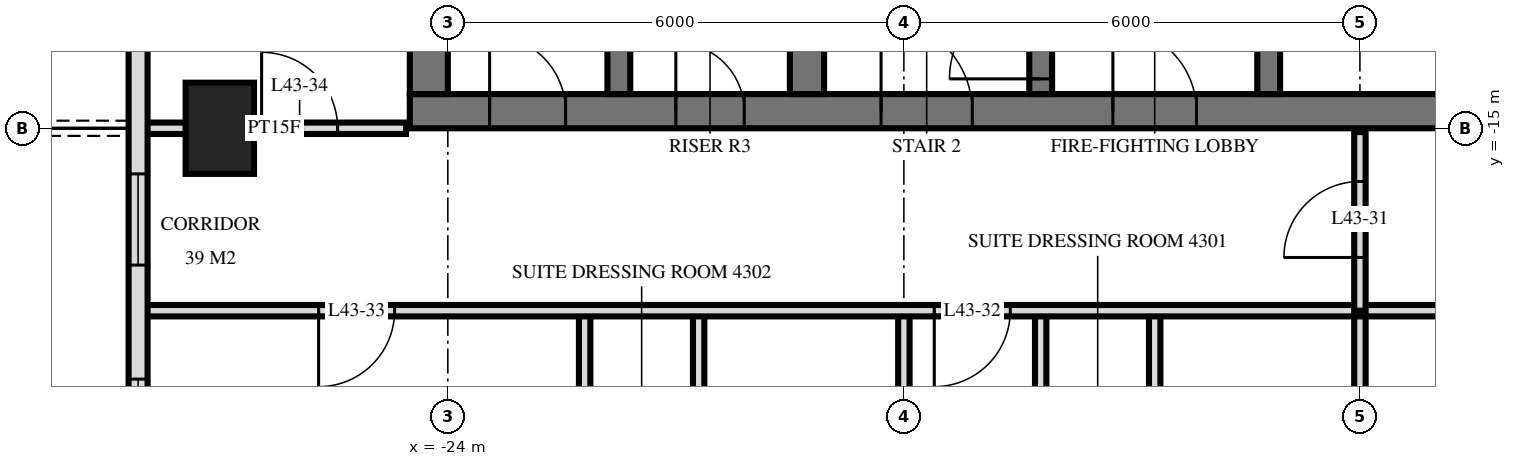
"""IFC4 building model, lengths in metres.
Left out: names, types, materials, properties, quantities, classifications, styles, units other than length and angle.
Written with IfcOpenShell. Run it as: python <this file> out.ifc"""

import sys

from ifc_helpers import new_model, si_unit, direction, frame, frame_2d, origin, origin_2d, place, context, subcontext, project, spatial, rectangle, extrude, element, fill, save


model = new_model("IFC4")
c1 = context("Model", 3, precision=1e-05, world=origin(), true_north=direction((0.0, 1.0)))
c2 = subcontext(c1, "Body", "Model", "MODEL_VIEW")
j1 = project(units=[si_unit("LENGTHUNIT", "METRE"), si_unit("PLANEANGLEUNIT", "RADIAN")], contexts=[c1])
p1 = place(None, origin())
s1 = spatial("IfcSite", under=j1, at=p1, CompositionType="ELEMENT")
p2 = place(p1, origin())
s2 = spatial("IfcBuilding", under=s1, at=p2, CompositionType="ELEMENT")
p3 = place(p2, frame((0.0, 0.0, 166.8)))
s3 = spatial("IfcBuildingStorey", under=s2, at=p3, CompositionType="ELEMENT", Elevation=166.8)
p4 = place(p3, frame((-27.0, -15.0, 0.0), z_axis=(0.0, 0.0, 1.0), x_axis=(0.0, 1.0, 0.0)))
e1 = element("IfcColumn", 1, at=p4, inside=s3, PredefinedType="COLUMN", context=c2, shape_type="SweptSolid", body=[
    extrude(rectangle(XDim=1.2, YDim=0.9, at=origin_2d()), origin(), (0.0, 0.0, 1.0), 3.6),
])
p5 = place(p3, frame((-24.5, -14.775, 0.0), z_axis=(0.0, 0.0, 1.0), x_axis=(1.0, 0.0, 0.0)))
e2 = element("IfcWall", 2, at=p5, inside=s3, PredefinedType="SHEAR", context=c2, shape_type="SweptSolid", body=[
    extrude(rectangle(XDim=14.5, YDim=0.45, at=frame_2d((7.25, 0.0))), origin(), (0.0, 0.0, 1.0), 3.6),
])
p6 = place(p5, frame((6.2, 0.0, 0.0)))
e3 = element("IfcOpeningElement", 3, at=p6, cuts=e2, PredefinedType="OPENING", context=c2, shape_type="SweptSolid", body=[
    extrude(rectangle(XDim=1.2, YDim=2.1, at=frame_2d((0.6, 1.05))), frame((0.0, 0.235, 0.0), z_axis=(0.0, -1.0, 0.0), x_axis=(1.0, 0.0, 0.0)), (0.0, 0.0, 1.0), 0.47),
])
p7 = place(p5, frame((9.25, 0.0, 0.0)))
e4 = element("IfcOpeningElement", 4, at=p7, cuts=e2, PredefinedType="OPENING", context=c2, shape_type="SweptSolid", body=[
    extrude(rectangle(XDim=1.1, YDim=2.1, at=frame_2d((0.55, 1.05))), frame((0.0, 0.235, 0.0), z_axis=(0.0, -1.0, 0.0), x_axis=(1.0, 0.0, 0.0)), (0.0, 0.0, 1.0), 0.47),
])
p8 = place(p5, frame((3.5, 0.0, 0.0)))
e5 = element("IfcOpeningElement", 5, at=p8, cuts=e2, PredefinedType="OPENING", context=c2, shape_type="SweptSolid", body=[
    extrude(rectangle(XDim=0.9, YDim=2.1, at=frame_2d((0.45, 1.05))), frame((0.0, 0.235, 0.0), z_axis=(0.0, -1.0, 0.0), x_axis=(1.0, 0.0, 0.0)), (0.0, 0.0, 1.0), 0.47),
])
p9 = place(p5, frame((1.05, 0.0, 0.0)))
e6 = element("IfcOpeningElement", 6, at=p9, cuts=e2, PredefinedType="OPENING", context=c2, shape_type="SweptSolid", body=[
    extrude(rectangle(XDim=1.0, YDim=2.1, at=frame_2d((0.5, 1.05))), frame((0.0, 0.235, 0.0), z_axis=(0.0, -1.0, 0.0), x_axis=(1.0, 0.0, 0.0)), (0.0, 0.0, 1.0), 0.47),
])
p10 = place(p3, frame((-24.25, -14.55, 0.0), z_axis=(0.0, 0.0, 1.0), x_axis=(0.0, 1.0, 0.0)))
e7 = element("IfcWall", 7, at=p10, inside=s3, PredefinedType="SHEAR", context=c2, shape_type="SweptSolid", body=[
    extrude(rectangle(XDim=14.1, YDim=0.5, at=frame_2d((7.05, 0.0))), origin(), (0.0, 0.0, 1.0), 3.6),
])
p11 = place(p3, frame((-13.2, -14.55, 0.0), z_axis=(0.0, 0.0, 1.0), x_axis=(0.0, 1.0, 0.0)))
e8 = element("IfcWall", 8, at=p11, inside=s3, PredefinedType="SHEAR", context=c2, shape_type="SweptSolid", body=[
    extrude(rectangle(XDim=5.4, YDim=0.3, at=frame_2d((2.7, 0.0))), origin(), (0.0, 0.0, 1.0), 3.6),
])
p12 = place(p11, frame((4.0, 0.0, 0.0)))
e9 = element("IfcOpeningElement", 9, at=p12, cuts=e8, PredefinedType="OPENING", context=c2, shape_type="SweptSolid", body=[
    extrude(rectangle(XDim=1.2, YDim=2.1, at=frame_2d((0.6, 1.05))), frame((0.0, 0.16, 0.0), z_axis=(0.0, -1.0, 0.0), x_axis=(1.0, 0.0, 0.0)), (0.0, 0.0, 1.0), 0.32),
])
p13 = place(p3, frame((-16.2, -14.55, 0.0), z_axis=(0.0, 0.0, 1.0), x_axis=(0.0, 1.0, 0.0)))
e10 = element("IfcWall", 10, at=p13, inside=s3, PredefinedType="SHEAR", context=c2, shape_type="SweptSolid", body=[
    extrude(rectangle(XDim=5.4, YDim=0.3, at=frame_2d((2.7, 0.0))), origin(), (0.0, 0.0, 1.0), 3.6),
])
p14 = place(p13, frame((0.2, 0.0, 0.0)))
e11 = element("IfcOpeningElement", 11, at=p14, cuts=e10, PredefinedType="OPENING", context=c2, shape_type="SweptSolid", body=[
    extrude(rectangle(XDim=1.2, YDim=2.1, at=frame_2d((0.6, 1.05))), frame((0.0, 0.16, 0.0), z_axis=(0.0, -1.0, 0.0), x_axis=(1.0, 0.0, 0.0)), (0.0, 0.0, 1.0), 0.32),
])
p15 = place(p3, frame((-19.275, -14.55, 0.0), z_axis=(0.0, 0.0, 1.0), x_axis=(0.0, 1.0, 0.0)))
e12 = element("IfcWall", 12, at=p15, inside=s3, PredefinedType="SHEAR", context=c2, shape_type="SweptSolid", body=[
    extrude(rectangle(XDim=5.4, YDim=0.45, at=frame_2d((2.7, 0.0))), origin(), (0.0, 0.0, 1.0), 3.6),
])
p16 = place(p3, frame((-21.75, -14.55, 0.0), z_axis=(0.0, 0.0, 1.0), x_axis=(0.0, 1.0, 0.0)))
e13 = element("IfcWall", 13, at=p16, inside=s3, PredefinedType="SHEAR", context=c2, shape_type="SweptSolid", body=[
    extrude(rectangle(XDim=5.4, YDim=0.3, at=frame_2d((2.7, 0.0))), origin(), (0.0, 0.0, 1.0), 3.6),
])
p17 = place(p3, frame((-28.075, -3.325, 0.0), z_axis=(0.0, 0.0, 1.0), x_axis=(0.0, -1.0, 0.0)))
e14 = element("IfcWall", 14, at=p17, inside=s3, PredefinedType="SOLIDWALL", context=c2, shape_type="SweptSolid", body=[
    extrude(rectangle(XDim=25.951, YDim=0.25, at=frame_2d((12.975, 0.0))), origin(), (0.0, 0.0, 1.0), 3.32),
])
p18 = place(p17, frame((7.525, 0.0, 0.0)))
e15 = element("IfcOpeningElement", 15, at=p18, cuts=e14, PredefinedType="OPENING", context=c2, shape_type="SweptSolid", body=[
    extrude(rectangle(XDim=1.8, YDim=2.4, at=frame_2d((0.9, 1.2))), frame((0.0, 0.135, 0.0), z_axis=(0.0, -1.0, 0.0), x_axis=(1.0, 0.0, 0.0)), (0.0, 0.0, 1.0), 0.27),
])
p19 = place(p17, frame((12.275, 0.0, 0.3)))
e16 = element("IfcOpeningElement", 16, at=p19, cuts=e14, PredefinedType="OPENING", context=c2, shape_type="SweptSolid", body=[
    extrude(rectangle(XDim=1.2, YDim=2.1, at=frame_2d((0.6, 1.05))), frame((0.0, 0.135, 0.0), z_axis=(0.0, -1.0, 0.0), x_axis=(1.0, 0.0, 0.0)), (0.0, 0.0, 1.0), 0.27),
])
p20 = place(p17, frame((14.975, 0.0, 0.3)))
e17 = element("IfcOpeningElement", 17, at=p20, cuts=e14, PredefinedType="OPENING", context=c2, shape_type="SweptSolid", body=[
    extrude(rectangle(XDim=2.4, YDim=2.1, at=frame_2d((1.2, 1.05))), frame((0.0, 0.135, 0.0), z_axis=(0.0, -1.0, 0.0), x_axis=(1.0, 0.0, 0.0)), (0.0, 0.0, 1.0), 0.27),
])
p21 = place(p17, frame((18.175, 0.0, 0.0)))
e18 = element("IfcOpeningElement", 18, at=p21, cuts=e14, PredefinedType="OPENING", context=c2, shape_type="SweptSolid", body=[
    extrude(rectangle(XDim=1.8, YDim=2.4, at=frame_2d((0.9, 1.2))), frame((0.0, 0.135, 0.0), z_axis=(0.0, -1.0, 0.0), x_axis=(1.0, 0.0, 0.0)), (0.0, 0.0, 1.0), 0.27),
])
p22 = place(p17, frame((21.075, 0.0, 0.0)))
e19 = element("IfcOpeningElement", 19, at=p22, cuts=e14, PredefinedType="OPENING", context=c2, shape_type="SweptSolid", body=[
    extrude(rectangle(XDim=1.8, YDim=2.4, at=frame_2d((0.9, 1.2))), frame((0.0, 0.135, 0.0), z_axis=(0.0, -1.0, 0.0), x_axis=(1.0, 0.0, 0.0)), (0.0, 0.0, 1.0), 0.27),
])
p23 = place(p17, frame((23.825, 0.0, 0.3)))
e20 = element("IfcOpeningElement", 20, at=p23, cuts=e14, PredefinedType="OPENING", context=c2, shape_type="SweptSolid", body=[
    extrude(rectangle(XDim=1.8, YDim=2.1, at=frame_2d((0.9, 1.05))), frame((0.0, 0.135, 0.0), z_axis=(0.0, -1.0, 0.0), x_axis=(1.0, 0.0, 0.0)), (0.0, 0.0, 1.0), 0.27),
])
p24 = place(p3, frame((-12.0, -17.4, 0.0), z_axis=(0.0, 0.0, 1.0), x_axis=(0.0, 1.0, 0.0)))
e21 = element("IfcWall", 21, at=p24, inside=s3, PredefinedType="PARTITIONING", context=c2, shape_type="SweptSolid", body=[
    extrude(rectangle(XDim=2.35, YDim=0.15, at=frame_2d((1.175, 0.0))), origin(), (0.0, 0.0, 1.0), 3.32),
])
p25 = place(p24, frame((0.7, 0.0, 0.0)))
e22 = element("IfcOpeningElement", 22, at=p25, cuts=e21, PredefinedType="OPENING", context=c2, shape_type="SweptSolid", body=[
    extrude(rectangle(XDim=1.0, YDim=2.1, at=frame_2d((0.5, 1.05))), frame((0.0, 0.085, 0.0), z_axis=(0.0, -1.0, 0.0), x_axis=(1.0, 0.0, 0.0)), (0.0, 0.0, 1.0), 0.17),
])
p26 = place(p3, frame((-12.0, -33.62, 0.0), z_axis=(0.0, 0.0, 1.0), x_axis=(0.0, 1.0, 0.0)))
e23 = element("IfcWall", 23, at=p26, inside=s3, PredefinedType="PARTITIONING", context=c2, shape_type="SweptSolid", body=[
    extrude(rectangle(XDim=16.22, YDim=0.15, at=frame_2d((8.11, 0.0))), origin(), (0.0, 0.0, 1.0), 3.32),
])
p27 = place(p3, frame((-14.7, -22.4, 0.0), z_axis=(0.0, 0.0, 1.0), x_axis=(0.0, 1.0, 0.0)))
e24 = element("IfcWall", 24, at=p27, inside=s3, PredefinedType="PARTITIONING", context=c2, shape_type="SweptSolid", body=[
    extrude(rectangle(XDim=5.0, YDim=0.15, at=frame_2d((2.5, 0.0))), origin(), (0.0, 0.0, 1.0), 3.32),
])
p28 = place(p3, frame((-16.2, -22.4, 0.0), z_axis=(0.0, 0.0, 1.0), x_axis=(0.0, 1.0, 0.0)))
e25 = element("IfcWall", 25, at=p28, inside=s3, PredefinedType="PARTITIONING", context=c2, shape_type="SweptSolid", body=[
    extrude(rectangle(XDim=5.0, YDim=0.15, at=frame_2d((2.5, 0.0))), origin(), (0.0, 0.0, 1.0), 3.32),
])
p29 = place(p28, frame((2.05, 0.0, 0.0)))
e26 = element("IfcOpeningElement", 26, at=p29, cuts=e25, PredefinedType="OPENING", context=c2, shape_type="SweptSolid", body=[
    extrude(rectangle(XDim=0.9, YDim=2.1, at=frame_2d((0.45, 1.05))), frame((0.0, 0.085, 0.0), z_axis=(0.0, -1.0, 0.0), x_axis=(1.0, 0.0, 0.0)), (0.0, 0.0, 1.0), 0.17),
])
p30 = place(p3, frame((-18.0, -33.62, 0.0), z_axis=(0.0, 0.0, 1.0), x_axis=(0.0, 1.0, 0.0)))
e27 = element("IfcWall", 27, at=p30, inside=s3, PredefinedType="PARTITIONING", context=c2, shape_type="SweptSolid", body=[
    extrude(rectangle(XDim=16.22, YDim=0.15, at=frame_2d((8.11, 0.0))), origin(), (0.0, 0.0, 1.0), 3.32),
])
p31 = place(p3, frame((-20.7, -21.6, 0.0), z_axis=(0.0, 0.0, 1.0), x_axis=(0.0, 1.0, 0.0)))
e28 = element("IfcWall", 28, at=p31, inside=s3, PredefinedType="PARTITIONING", context=c2, shape_type="SweptSolid", body=[
    extrude(rectangle(XDim=4.2, YDim=0.15, at=frame_2d((2.1, 0.0))), origin(), (0.0, 0.0, 1.0), 3.32),
])
p32 = place(p3, frame((-22.2, -21.6, 0.0), z_axis=(0.0, 0.0, 1.0), x_axis=(0.0, 1.0, 0.0)))
e29 = element("IfcWall", 29, at=p32, inside=s3, PredefinedType="PARTITIONING", context=c2, shape_type="SweptSolid", body=[
    extrude(rectangle(XDim=4.2, YDim=0.15, at=frame_2d((2.1, 0.0))), origin(), (0.0, 0.0, 1.0), 3.32),
])
p33 = place(p32, frame((1.65, 0.0, 0.0)))
e30 = element("IfcOpeningElement", 30, at=p33, cuts=e29, PredefinedType="OPENING", context=c2, shape_type="SweptSolid", body=[
    extrude(rectangle(XDim=0.9, YDim=2.1, at=frame_2d((0.45, 1.05))), frame((0.0, 0.085, 0.0), z_axis=(0.0, -1.0, 0.0), x_axis=(1.0, 0.0, 0.0)), (0.0, 0.0, 1.0), 0.17),
])
p34 = place(p3, frame((-28.02, -17.4, 0.0), z_axis=(0.0, 0.0, 1.0), x_axis=(1.0, 0.0, 0.0)))
e31 = element("IfcWall", 31, at=p34, inside=s3, PredefinedType="PARTITIONING", context=c2, shape_type="SweptSolid", body=[
    extrude(rectangle(XDim=56.04, YDim=0.15, at=frame_2d((28.02, 0.0))), origin(), (0.0, 0.0, 1.0), 3.32),
])
p35 = place(p34, frame((10.42, 0.0, 0.0)))
e32 = element("IfcOpeningElement", 32, at=p35, cuts=e31, PredefinedType="OPENING", context=c2, shape_type="SweptSolid", body=[
    extrude(rectangle(XDim=1.0, YDim=2.1, at=frame_2d((0.5, 1.05))), frame((0.0, 0.085, 0.0), z_axis=(0.0, -1.0, 0.0), x_axis=(1.0, 0.0, 0.0)), (0.0, 0.0, 1.0), 0.17),
])
p36 = place(p34, frame((2.32, 0.0, 0.0)))
e33 = element("IfcOpeningElement", 33, at=p36, cuts=e31, PredefinedType="OPENING", context=c2, shape_type="SweptSolid", body=[
    extrude(rectangle(XDim=1.0, YDim=2.1, at=frame_2d((0.5, 1.05))), frame((0.0, 0.085, 0.0), z_axis=(0.0, -1.0, 0.0), x_axis=(1.0, 0.0, 0.0)), (0.0, 0.0, 1.0), 0.17),
])
p37 = place(p34, frame((49.72, 0.0, 0.0)))
e34 = element("IfcOpeningElement", 34, at=p37, cuts=e31, PredefinedType="OPENING", context=c2, shape_type="SweptSolid", body=[
    extrude(rectangle(XDim=1.0, YDim=2.1, at=frame_2d((0.5, 1.05))), frame((0.0, 0.085, 0.0), z_axis=(0.0, -1.0, 0.0), x_axis=(1.0, 0.0, 0.0)), (0.0, 0.0, 1.0), 0.17),
])
p38 = place(p34, frame((23.02, 0.0, 0.0)))
e35 = element("IfcOpeningElement", 35, at=p38, cuts=e31, PredefinedType="OPENING", context=c2, shape_type="SweptSolid", body=[
    extrude(rectangle(XDim=1.0, YDim=2.1, at=frame_2d((0.5, 1.05))), frame((0.0, 0.085, 0.0), z_axis=(0.0, -1.0, 0.0), x_axis=(1.0, 0.0, 0.0)), (0.0, 0.0, 1.0), 0.17),
])
p39 = place(p34, frame((35.02, 0.0, 0.0)))
e36 = element("IfcOpeningElement", 36, at=p39, cuts=e31, PredefinedType="OPENING", context=c2, shape_type="SweptSolid", body=[
    extrude(rectangle(XDim=1.0, YDim=2.1, at=frame_2d((0.5, 1.05))), frame((0.0, 0.085, 0.0), z_axis=(0.0, -1.0, 0.0), x_axis=(1.0, 0.0, 0.0)), (0.0, 0.0, 1.0), 0.17),
])
p40 = place(p3, frame((-28.02, -15.0, 0.0), z_axis=(0.0, 0.0, 1.0), x_axis=(1.0, 0.0, 0.0)))
e37 = element("IfcWall", 37, at=p40, inside=s3, PredefinedType="PARTITIONING", context=c2, shape_type="SweptSolid", body=[
    extrude(rectangle(XDim=3.47, YDim=0.15, at=frame_2d((1.735, 0.0))), origin(), (0.0, 0.0, 1.0), 3.32),
])
p41 = place(p40, frame((1.57, 0.0, 0.0)))
e38 = element("IfcOpeningElement", 38, at=p41, cuts=e37, PredefinedType="OPENING", context=c2, shape_type="SweptSolid", body=[
    extrude(rectangle(XDim=1.0, YDim=2.1, at=frame_2d((0.5, 1.05))), frame((0.0, 0.085, 0.0), z_axis=(0.0, -1.0, 0.0), x_axis=(1.0, 0.0, 0.0)), (0.0, 0.0, 1.0), 0.17),
])
p42 = place(p19, origin())
e39 = element("IfcWindow", 39, at=p42, inside=s3, PartitioningType="SINGLE_PANEL", PredefinedType="WINDOW", context=c2, shape_type="SweptSolid", body=[
    extrude(rectangle(XDim=1.2, YDim=2.1, at=frame_2d((0.6, 1.05))), frame((0.0, 0.03, 0.0), z_axis=(0.0, -1.0, 0.0), x_axis=(1.0, 0.0, 0.0)), (0.0, 0.0, 1.0), 0.06),
])
fill(e16, e39)
p43 = place(p20, origin())
e40 = element("IfcWindow", 40, at=p43, inside=s3, PartitioningType="SINGLE_PANEL", PredefinedType="WINDOW", context=c2, shape_type="SweptSolid", body=[
    extrude(rectangle(XDim=2.4, YDim=2.1, at=frame_2d((1.2, 1.05))), frame((0.0, 0.03, 0.0), z_axis=(0.0, -1.0, 0.0), x_axis=(1.0, 0.0, 0.0)), (0.0, 0.0, 1.0), 0.06),
])
fill(e17, e40)
p44 = place(p6, origin())
e41 = element("IfcDoor", 41, at=p44, inside=s3, OperationType="SINGLE_SWING_RIGHT", PredefinedType="DOOR", context=c2, shape_type="SweptSolid", body=[
    extrude(rectangle(XDim=1.2, YDim=2.1, at=frame_2d((0.6, 1.05))), frame((0.0, 0.025, 0.0), z_axis=(0.0, -1.0, 0.0), x_axis=(1.0, 0.0, 0.0)), (0.0, 0.0, 1.0), 0.05),
])
fill(e3, e41)
p45 = place(p7, origin())
e42 = element("IfcDoor", 42, at=p45, inside=s3, OperationType="SINGLE_SWING_RIGHT", PredefinedType="DOOR", context=c2, shape_type="SweptSolid", body=[
    extrude(rectangle(XDim=1.1, YDim=2.1, at=frame_2d((0.55, 1.05))), frame((0.0, 0.025, 0.0), z_axis=(0.0, -1.0, 0.0), x_axis=(1.0, 0.0, 0.0)), (0.0, 0.0, 1.0), 0.05),
])
fill(e4, e42)
p46 = place(p8, origin())
e43 = element("IfcDoor", 43, at=p46, inside=s3, OperationType="SINGLE_SWING_RIGHT", PredefinedType="DOOR", context=c2, shape_type="SweptSolid", body=[
    extrude(rectangle(XDim=0.9, YDim=2.1, at=frame_2d((0.45, 1.05))), frame((0.0, 0.025, 0.0), z_axis=(0.0, -1.0, 0.0), x_axis=(1.0, 0.0, 0.0)), (0.0, 0.0, 1.0), 0.05),
])
fill(e5, e43)
p47 = place(p9, origin())
e44 = element("IfcDoor", 44, at=p47, inside=s3, OperationType="SINGLE_SWING_RIGHT", PredefinedType="DOOR", context=c2, shape_type="SweptSolid", body=[
    extrude(rectangle(XDim=1.0, YDim=2.1, at=frame_2d((0.5, 1.05))), frame((0.0, 0.025, 0.0), z_axis=(0.0, -1.0, 0.0), x_axis=(1.0, 0.0, 0.0)), (0.0, 0.0, 1.0), 0.05),
])
fill(e6, e44)
p48 = place(p14, origin())
e45 = element("IfcDoor", 45, at=p48, inside=s3, OperationType="SINGLE_SWING_RIGHT", PredefinedType="DOOR", context=c2, shape_type="SweptSolid", body=[
    extrude(rectangle(XDim=1.2, YDim=2.1, at=frame_2d((0.6, 1.05))), frame((0.0, 0.025, 0.0), z_axis=(0.0, -1.0, 0.0), x_axis=(1.0, 0.0, 0.0)), (0.0, 0.0, 1.0), 0.05),
])
fill(e11, e45)
p49 = place(p25, origin())
e46 = element("IfcDoor", 46, at=p49, inside=s3, OperationType="SINGLE_SWING_RIGHT", PredefinedType="DOOR", context=c2, shape_type="SweptSolid", body=[
    extrude(rectangle(XDim=1.0, YDim=2.1, at=frame_2d((0.5, 1.05))), frame((0.0, 0.025, 0.0), z_axis=(0.0, -1.0, 0.0), x_axis=(1.0, 0.0, 0.0)), (0.0, 0.0, 1.0), 0.05),
])
fill(e22, e46)
p50 = place(p35, frame((0.5, 0.0, 0.0), z_axis=(0.0, 0.0, 1.0), x_axis=(-1.0, 0.0, 0.0)))
e47 = element("IfcDoor", 47, at=p50, inside=s3, OperationType="SINGLE_SWING_LEFT", PredefinedType="DOOR", context=c2, shape_type="SweptSolid", body=[
    extrude(rectangle(XDim=1.0, YDim=2.1, at=frame_2d((0.0, 1.05))), frame((0.0, -0.025, 0.0), z_axis=(0.0, 1.0, 0.0), x_axis=(-1.0, 0.0, 0.0)), (0.0, 0.0, 1.0), 0.05),
])
fill(e32, e47)
p51 = place(p36, frame((0.5, 0.0, 0.0), z_axis=(0.0, 0.0, 1.0), x_axis=(-1.0, 0.0, 0.0)))
e48 = element("IfcDoor", 48, at=p51, inside=s3, OperationType="SINGLE_SWING_LEFT", PredefinedType="DOOR", context=c2, shape_type="SweptSolid", body=[
    extrude(rectangle(XDim=1.0, YDim=2.1, at=frame_2d((0.0, 1.05))), frame((0.0, -0.025, 0.0), z_axis=(0.0, 1.0, 0.0), x_axis=(-1.0, 0.0, 0.0)), (0.0, 0.0, 1.0), 0.05),
])
fill(e33, e48)
p52 = place(p41, origin())
e49 = element("IfcDoor", 49, at=p52, inside=s3, OperationType="SINGLE_SWING_RIGHT", PredefinedType="DOOR", context=c2, shape_type="SweptSolid", body=[
    extrude(rectangle(XDim=1.0, YDim=2.1, at=frame_2d((0.5, 1.05))), frame((0.0, 0.025, 0.0), z_axis=(0.0, -1.0, 0.0), x_axis=(1.0, 0.0, 0.0)), (0.0, 0.0, 1.0), 0.05),
])
fill(e38, e49)
save(model, sys.argv[1])
